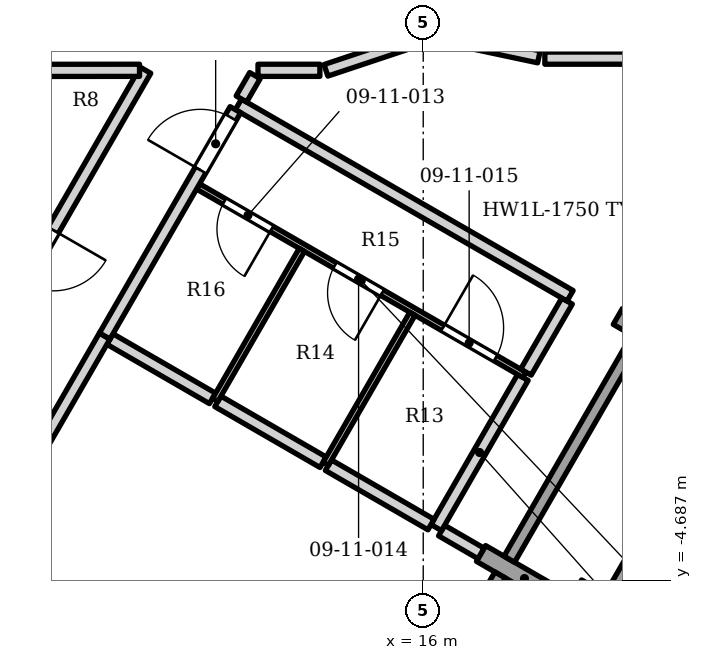
"""IFC4 building model, lengths in metres.
Left out: names, types, materials, properties, quantities, classifications, styles, units other than length and angle.
Written with IfcOpenShell. Run it as: python <this file> out.ifc"""

import sys

from ifc_helpers import new_model, si_unit, direction, frame, frame_2d, origin, origin_2d, place, context, subcontext, project, spatial, rectangle, extrude, element, fill, save


model = new_model("IFC4")
c1 = context("Model", 3, precision=1e-05, world=origin(), true_north=direction((0.0, 1.0)))
c2 = subcontext(c1, "Body", "Model", "MODEL_VIEW")
j1 = project(units=[si_unit("LENGTHUNIT", "METRE"), si_unit("PLANEANGLEUNIT", "RADIAN")], contexts=[c1])
p1 = place(None, origin())
s1 = spatial("IfcSite", under=j1, at=p1, CompositionType="ELEMENT")
p2 = place(p1, origin())
s2 = spatial("IfcBuilding", under=s1, at=p2, CompositionType="ELEMENT")
p3 = place(p2, frame((0.0, 0.0, 56.2)))
s3 = spatial("IfcBuildingStorey", under=s2, at=p3, CompositionType="ELEMENT", Elevation=56.2)
p4 = place(p3, frame((18.899, -5.371, 0.0), z_axis=(0.0, 0.0, 1.0), x_axis=(0.500000015115, 0.866025395058, 0.0)))
e1 = element("IfcColumn", 1, at=p4, inside=s3, PredefinedType="COLUMN", context=c2, shape_type="SweptSolid", body=[
    extrude(rectangle(XDim=0.9, YDim=1.2, at=origin_2d()), origin(), (0.0, 0.0, 1.0), 3.4),
])
p5 = place(p3, frame((18.379, -5.071, 0.0), z_axis=(0.0, 0.0, 1.0), x_axis=(-0.866003217194, 0.500038426333, 0.0)))
e2 = element("IfcWall", 2, at=p5, inside=s3, PredefinedType="SOLIDWALL", context=c2, shape_type="SweptSolid", body=[
    extrude(rectangle(XDim=1.65, YDim=0.3, at=frame_2d((0.825, 0.0))), origin(), (0.0, 0.0, 1.0), 2.65),
])
p6 = place(p3, frame((19.201, -0.349, 0.0), z_axis=(0.0, 0.0, 1.0), x_axis=(0.866040211805, -0.499974350878, 0.0)))
e3 = element("IfcWall", 3, at=p6, inside=s3, PredefinedType="SOLIDWALL", context=c2, shape_type="SweptSolid", body=[
    extrude(rectangle(XDim=1.65, YDim=0.3, at=frame_2d((0.825, 0.0))), origin(), (0.0, 0.0, 1.0), 2.65),
])
p7 = place(p3, frame((15.165, -8.238, 0.0), z_axis=(0.0, 0.0, 1.0), x_axis=(0.500027713859, 0.866009402589, 0.0)))
e4 = element("IfcWall", 4, at=p7, inside=s3, PredefinedType="ELEMENTEDWALL", context=c2, shape_type="SweptSolid", body=[
    extrude(rectangle(XDim=4.2, YDim=0.2, at=frame_2d((2.1, 0.0))), origin(), (0.0, 0.0, 1.0), 2.65),
])
p8 = place(p3, frame((19.124, -4.981, 0.0), z_axis=(0.0, 0.0, 1.0), x_axis=(0.499961193289, 0.866047807691, 0.0)))
e5 = element("IfcWall", 5, at=p8, inside=s3, PredefinedType="SOLIDWALL", context=c2, shape_type="SweptSolid", body=[
    extrude(rectangle(XDim=3.6, YDim=0.3, at=frame_2d((1.8, 0.0))), origin(), (0.0, 0.0, 1.0), 2.63),
])
p9 = place(p3, frame((17.415, -4.341, 0.0), z_axis=(0.0, 0.0, 1.0), x_axis=(0.500027713859, 0.866009402589, 0.0)))
e6 = element("IfcWall", 6, at=p9, inside=s3, PredefinedType="ELEMENTEDWALL", context=c2, shape_type="SweptSolid", body=[
    extrude(rectangle(XDim=4.2, YDim=0.2, at=frame_2d((2.1, 0.0))), origin(), (0.0, 0.0, 1.0), 2.65),
])
p10 = place(p3, frame((3.552, -9.949, 0.0), z_axis=(0.0, 0.0, 1.0), x_axis=(0.4999924075, 0.866029787272, 0.0)))
e7 = element("IfcWall", 7, at=p10, inside=s3, PredefinedType="PARTITIONING", context=c2, shape_type="SweptSolid", body=[
    extrude(rectangle(XDim=15.761, YDim=0.2, at=frame_2d((7.881, 0.0))), origin(), (0.0, 0.0, 1.0), 2.384),
])
p11 = place(p10, frame((7.304, 0.0, 0.0)))
e8 = element("IfcOpeningElement", 8, at=p11, cuts=e7, PredefinedType="OPENING", context=c2, shape_type="SweptSolid", body=[
    extrude(rectangle(XDim=1.0, YDim=2.1, at=frame_2d((0.5, 1.05))), frame((0.0, 0.11, 0.0), z_axis=(0.0, -1.0, 0.0), x_axis=(1.0, 0.0, 0.0)), (0.0, 0.0, 1.0), 0.22),
])
p12 = place(p10, frame((11.727, 0.0, 0.0)))
e9 = element("IfcOpeningElement", 9, at=p12, cuts=e7, PredefinedType="OPENING", context=c2, shape_type="SweptSolid", body=[
    extrude(rectangle(XDim=1.0, YDim=2.1, at=frame_2d((0.5, 1.05))), frame((0.0, 0.11, 0.0), z_axis=(0.0, -1.0, 0.0), x_axis=(1.0, 0.0, 0.0)), (0.0, 0.0, 1.0), 0.22),
])
p13 = place(p3, frame((16.302, -3.869, 0.0), z_axis=(0.0, 0.0, 1.0), x_axis=(0.864957684326, -0.501844801034, 0.0)))
e10 = element("IfcWall", 10, at=p13, inside=s3, PredefinedType="PARTITIONING", context=c2, shape_type="SweptSolid", body=[
    extrude(rectangle(XDim=0.75, YDim=0.2, at=frame_2d((0.375, 0.0))), origin(), (0.0, 0.0, 1.0), 3.23),
])
p14 = place(p3, frame((16.215, -3.821, 0.0), z_axis=(0.0, 0.0, 1.0), x_axis=(0.499509955189, 0.866308146486, 0.0)))
e11 = element("IfcWall", 11, at=p14, inside=s3, PredefinedType="PARTITIONING", context=c2, shape_type="SweptSolid", body=[
    extrude(rectangle(XDim=2.851, YDim=0.2, at=frame_2d((1.426, 0.0))), origin(), (0.0, 0.0, 1.0), 3.23),
])
p15 = place(p3, frame((14.44, -2.794, 0.0), z_axis=(0.0, 0.0, 1.0), x_axis=(0.865603401191, -0.500730218626, 0.0)))
e12 = element("IfcWall", 12, at=p15, inside=s3, PredefinedType="PARTITIONING", context=c2, shape_type="SweptSolid", body=[
    extrude(rectangle(XDim=1.95, YDim=0.2, at=frame_2d((0.975, 0.0))), origin(), (0.0, 0.0, 1.0), 3.23),
])
p16 = place(p3, frame((12.622, -1.744, 0.0), z_axis=(0.0, 0.0, 1.0), x_axis=(0.865571128327, -0.500786004005, 0.0)))
e13 = element("IfcWall", 13, at=p16, inside=s3, PredefinedType="PARTITIONING", context=c2, shape_type="SweptSolid", body=[
    extrude(rectangle(XDim=2.0, YDim=0.2, at=frame_2d((1.0, 0.0))), origin(), (0.0, 0.0, 1.0), 2.384),
])
p17 = place(p3, frame((12.297, 1.79, 0.0), z_axis=(0.0, 0.0, 1.0), x_axis=(0.866018973846, -0.500011136814, 0.0)))
e14 = element("IfcWall", 14, at=p17, inside=s3, PredefinedType="PARTITIONING", context=c2, shape_type="SweptSolid", body=[
    extrude(rectangle(XDim=6.198, YDim=0.1, at=frame_2d((3.099, 0.0))), origin(), (0.0, 0.0, 1.0), 2.384),
])
p18 = place(p17, frame((0.498, 0.0, 0.0)))
e15 = element("IfcOpeningElement", 15, at=p18, cuts=e14, PredefinedType="OPENING", context=c2, shape_type="SweptSolid", body=[
    extrude(rectangle(XDim=0.9, YDim=2.1, at=frame_2d((0.45, 1.05))), frame((0.0, 0.06, 0.0), z_axis=(0.0, -1.0, 0.0), x_axis=(1.0, 0.0, 0.0)), (0.0, 0.0, 1.0), 0.12),
])
p19 = place(p17, frame((2.598, 0.0, 0.0)))
e16 = element("IfcOpeningElement", 16, at=p19, cuts=e14, PredefinedType="OPENING", context=c2, shape_type="SweptSolid", body=[
    extrude(rectangle(XDim=0.9, YDim=2.1, at=frame_2d((0.45, 1.05))), frame((0.0, 0.06, 0.0), z_axis=(0.0, -1.0, 0.0), x_axis=(1.0, 0.0, 0.0)), (0.0, 0.0, 1.0), 0.12),
])
p20 = place(p17, frame((4.648, 0.0, 0.0)))
e17 = element("IfcOpeningElement", 17, at=p20, cuts=e14, PredefinedType="OPENING", context=c2, shape_type="SweptSolid", body=[
    extrude(rectangle(XDim=1.0, YDim=2.1, at=frame_2d((0.5, 1.05))), frame((0.0, 0.06, 0.0), z_axis=(0.0, -1.0, 0.0), x_axis=(1.0, 0.0, 0.0)), (0.0, 0.0, 1.0), 0.12),
])
p21 = place(p3, frame((17.689, -1.263, 0.0), z_axis=(0.0, 0.0, 1.0), x_axis=(0.501000622125, 0.865446923058, 0.0)))
e18 = element("IfcWall", 18, at=p21, inside=s3, PredefinedType="PARTITIONING", context=c2, shape_type="SweptSolid", body=[
    extrude(rectangle(XDim=1.35, YDim=0.2, at=frame_2d((0.675, 0.0))), origin(), (0.0, 0.0, 1.0), 2.702),
])
p22 = place(p3, frame((10.848, -0.72, 0.0), z_axis=(0.0, 0.0, 1.0), x_axis=(0.865600721384, -0.500734851134, 0.0)))
e19 = element("IfcWall", 19, at=p22, inside=s3, PredefinedType="PARTITIONING", context=c2, shape_type="SweptSolid", body=[
    extrude(rectangle(XDim=1.948, YDim=0.2, at=frame_2d((0.974, 0.0))), origin(), (0.0, 0.0, 1.0), 3.23),
])
p23 = place(p3, frame((1.76, -16.26, 0.0), z_axis=(0.0, 0.0, 1.0), x_axis=(0.5000018851, 0.866024315419, 0.0)))
e20 = element("IfcWall", 20, at=p23, inside=s3, PredefinedType="PARTITIONING", context=c2, shape_type="SweptSolid", body=[
    extrude(rectangle(XDim=18.0, YDim=0.2, at=frame_2d((9.0, 0.0))), origin(), (0.0, 0.0, 1.0), 2.302),
])
p24 = place(p23, frame((8.2, 0.0, 0.0)))
e21 = element("IfcOpeningElement", 21, at=p24, cuts=e20, PredefinedType="OPENING", context=c2, shape_type="SweptSolid", body=[
    extrude(rectangle(XDim=1.6, YDim=2.1, at=frame_2d((0.8, 1.05))), frame((0.0, 0.11, 0.0), z_axis=(0.0, -1.0, 0.0), x_axis=(1.0, 0.0, 0.0)), (0.0, 0.0, 1.0), 0.22),
])
p25 = place(p3, frame((14.398, -2.771, 0.0), z_axis=(0.0, 0.0, 1.0), x_axis=(0.500009219579, 0.866020080793, 0.0)))
e22 = element("IfcWall", 22, at=p25, inside=s3, PredefinedType="PARTITIONING", context=c2, shape_type="SweptSolid", body=[
    extrude(rectangle(XDim=2.85, YDim=0.1, at=frame_2d((1.425, 0.0))), origin(), (0.0, 0.0, 1.0), 3.23),
])
p26 = place(p3, frame((12.96, 3.139, 0.0), z_axis=(0.0, 0.0, 1.0), x_axis=(0.866164933594, -0.499758249369, 0.0)))
e23 = element("IfcWall", 23, at=p26, inside=s3, PredefinedType="PARTITIONING", context=c2, shape_type="SweptSolid", body=[
    extrude(rectangle(XDim=6.298, YDim=0.2, at=frame_2d((3.149, 0.0))), origin(), (0.0, 0.0, 1.0), 2.384),
])
p27 = place(p3, frame((12.579, -1.722, 0.0), z_axis=(0.0, 0.0, 1.0), x_axis=(0.499972122318, 0.866041498374, 0.0)))
e24 = element("IfcWall", 24, at=p27, inside=s3, PredefinedType="PARTITIONING", context=c2, shape_type="SweptSolid", body=[
    extrude(rectangle(XDim=2.85, YDim=0.1, at=frame_2d((1.425, 0.0))), origin(), (0.0, 0.0, 1.0), 2.384),
])
p28 = place(p3, frame((10.761, -0.67, 0.0), z_axis=(0.0, 0.0, 1.0), x_axis=(0.499981388828, 0.866036148683, 0.0)))
e25 = element("IfcWall", 25, at=p28, inside=s3, PredefinedType="PARTITIONING", context=c2, shape_type="SweptSolid", body=[
    extrude(rectangle(XDim=4.299, YDim=0.2, at=frame_2d((2.149, 0.0))), origin(), (0.0, 0.0, 1.0), 3.23),
])
p29 = place(p28, frame((3.15, 0.0, 0.0)))
e26 = element("IfcOpeningElement", 26, at=p29, cuts=e25, PredefinedType="OPENING", context=c2, shape_type="SweptSolid", body=[
    extrude(rectangle(XDim=1.0, YDim=2.1, at=frame_2d((0.5, 1.05))), frame((0.0, 0.11, 0.0), z_axis=(0.0, -1.0, 0.0), x_axis=(1.0, 0.0, 0.0)), (0.0, 0.0, 1.0), 0.22),
])
p30 = place(p3, frame((13.01, 3.228, 0.0), z_axis=(0.0, 0.0, 1.0), x_axis=(0.500689591902, 0.865626901477, 0.0)))
e27 = element("IfcWall", 27, at=p30, inside=s3, PredefinedType="PARTITIONING", context=c2, shape_type="SweptSolid", body=[
    extrude(rectangle(XDim=0.444, YDim=0.2, at=frame_2d((0.222, 0.0))), origin(), (0.0, 0.0, 1.0), 3.23),
])
p31 = place(p3, frame((9.0, 3.698, 0.0), z_axis=(0.0, 0.0, 1.0), x_axis=(0.999999731873, 0.000732293977, 0.0)))
e28 = element("IfcWall", 28, at=p31, inside=s3, PredefinedType="PARTITIONING", context=c2, shape_type="SweptSolid", body=[
    extrude(rectangle(XDim=2.334, YDim=0.2, at=frame_2d((1.167, 0.0))), origin(), (0.0, 0.0, 1.0), 3.23),
])
p32 = place(p3, frame((13.282, 3.699, 0.0), z_axis=(0.0, 0.0, 1.0), x_axis=(1.0, 0.0, 0.0)))
e29 = element("IfcWall", 29, at=p32, inside=s3, PredefinedType="PARTITIONING", context=c2, shape_type="SweptSolid", body=[
    extrude(rectangle(XDim=1.018, YDim=0.2, at=frame_2d((0.509, 0.0))), origin(), (0.0, 0.0, 1.0), 2.384),
])
p33 = place(p3, frame((14.4, 3.699, 0.0), z_axis=(0.0, 0.0, 1.0), x_axis=(0.948655351627, 0.316311592943, 0.0)))
e30 = element("IfcWall", 30, at=p33, inside=s3, PredefinedType="PARTITIONING", context=c2, shape_type="SweptSolid", body=[
    extrude(rectangle(XDim=1.747, YDim=0.2, at=frame_2d((0.874, 0.0))), origin(), (0.0, 0.0, 1.0), 3.23),
])
p34 = place(p3, frame((18.0, 3.899, 0.0), z_axis=(0.0, 0.0, 1.0), x_axis=(0.999999975374, 0.000221926315, 0.0)))
e31 = element("IfcWall", 31, at=p34, inside=s3, PredefinedType="PARTITIONING", context=c2, shape_type="SweptSolid", body=[
    extrude(rectangle(XDim=2.2, YDim=0.2, at=frame_2d((1.1, 0.0))), origin(), (0.0, 0.0, 1.0), 3.23),
])
p35 = place(p3, frame((16.342, 4.252, 0.0), z_axis=(0.0, 0.0, 1.0), x_axis=(0.978117199083, -0.208054667953, 0.0)))
e32 = element("IfcWall", 32, at=p35, inside=s3, PredefinedType="PARTITIONING", context=c2, shape_type="SweptSolid", body=[
    extrude(rectangle(XDim=1.595, YDim=0.2, at=frame_2d((0.797, 0.0))), origin(), (0.0, 0.0, 1.0), 2.45),
])
p36 = place(p12, origin())
e33 = element("IfcDoor", 33, at=p36, inside=s3, OperationType="SINGLE_SWING_RIGHT", PredefinedType="DOOR", context=c2, shape_type="SweptSolid", body=[
    extrude(rectangle(XDim=1.0, YDim=2.1, at=frame_2d((0.5, 1.05))), frame((0.0, 0.025, 0.0), z_axis=(0.0, -1.0, 0.0), x_axis=(1.0, 0.0, 0.0)), (0.0, 0.0, 1.0), 0.05),
])
fill(e9, e33)
p37 = place(p29, origin())
e34 = element("IfcDoor", 34, at=p37, inside=s3, OperationType="SINGLE_SWING_LEFT", PredefinedType="DOOR", context=c2, shape_type="SweptSolid", body=[
    extrude(rectangle(XDim=1.0, YDim=2.1, at=frame_2d((0.5, 1.05))), frame((0.0, 0.025, 0.0), z_axis=(0.0, -1.0, 0.0), x_axis=(1.0, 0.0, 0.0)), (0.0, 0.0, 1.0), 0.05),
])
fill(e26, e34)
p38 = place(p18, origin())
e35 = element("IfcDoor", 35, at=p38, inside=s3, OperationType="SINGLE_SWING_RIGHT", PredefinedType="DOOR", context=c2, shape_type="SweptSolid", body=[
    extrude(rectangle(XDim=0.9, YDim=2.1, at=frame_2d((0.45, 1.05))), frame((0.0, 0.025, 0.0), z_axis=(0.0, -1.0, 0.0), x_axis=(1.0, 0.0, 0.0)), (0.0, 0.0, 1.0), 0.05),
])
fill(e15, e35)
p39 = place(p19, origin())
e36 = element("IfcDoor", 36, at=p39, inside=s3, OperationType="SINGLE_SWING_RIGHT", PredefinedType="DOOR", context=c2, shape_type="SweptSolid", body=[
    extrude(rectangle(XDim=0.9, YDim=2.1, at=frame_2d((0.45, 1.05))), frame((0.0, 0.025, 0.0), z_axis=(0.0, -1.0, 0.0), x_axis=(1.0, 0.0, 0.0)), (0.0, 0.0, 1.0), 0.05),
])
fill(e16, e36)
p40 = place(p20, origin())
e37 = element("IfcDoor", 37, at=p40, inside=s3, OperationType="SINGLE_SWING_LEFT", PredefinedType="DOOR", context=c2, shape_type="SweptSolid", body=[
    extrude(rectangle(XDim=1.0, YDim=2.1, at=frame_2d((0.5, 1.05))), frame((0.0, 0.025, 0.0), z_axis=(0.0, -1.0, 0.0), x_axis=(1.0, 0.0, 0.0)), (0.0, 0.0, 1.0), 0.05),
])
fill(e17, e37)
save(model, sys.argv[1])
